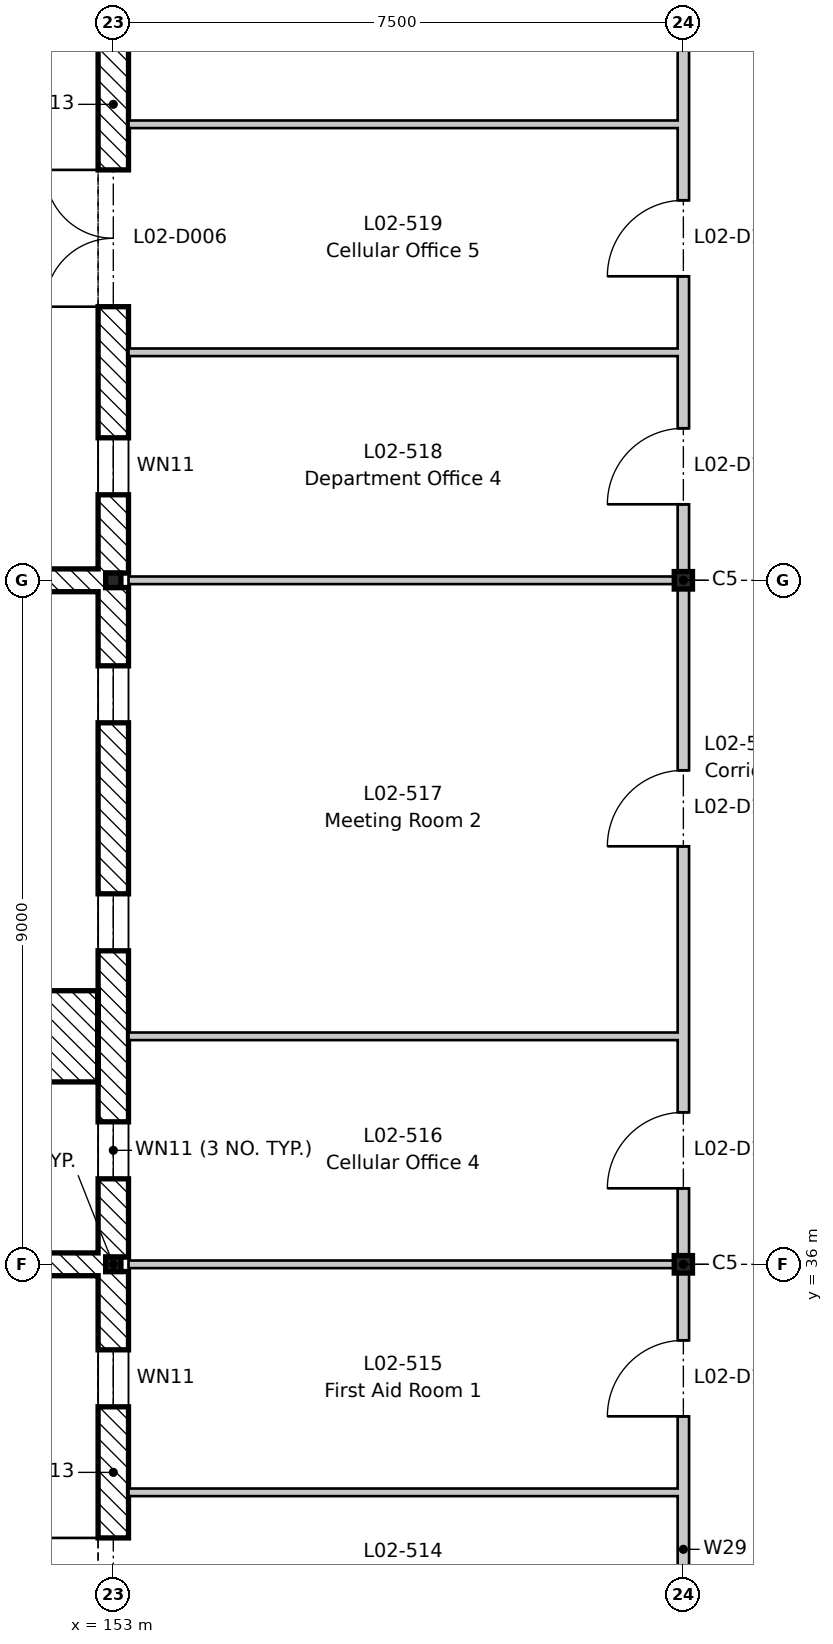
"""IFC4 building model, lengths in metres.
Left out: names, types, materials, properties, quantities, classifications, styles, units other than length and angle.
Written with IfcOpenShell. Run it as: python <this file> out.ifc"""

import sys

from ifc_helpers import new_model, si_unit, direction, frame, frame_2d, origin, origin_2d, place, context, subcontext, project, spatial, rectangle, i_section, extrude, element, fill, save


model = new_model("IFC4")
c1 = context("Model", 3, precision=1e-05, world=origin(), true_north=direction((0.0, 1.0)))
c2 = subcontext(c1, "Body", "Model", "MODEL_VIEW")
j1 = project(units=[si_unit("LENGTHUNIT", "METRE"), si_unit("PLANEANGLEUNIT", "RADIAN")], contexts=[c1])
p1 = place(None, origin())
s1 = spatial("IfcSite", under=j1, at=p1, CompositionType="ELEMENT")
p2 = place(p1, origin())
s2 = spatial("IfcBuilding", under=s1, at=p2, CompositionType="ELEMENT")
p3 = place(p2, frame((0.0, 0.0, 9.9)))
s3 = spatial("IfcBuildingStorey", under=s2, at=p3, CompositionType="ELEMENT", Elevation=9.9)
for number, where, z_axis, x_axis in (
    (1, (153.0, 36.0, -0.2), (0.0, 0.0, 1.0), (1.0, 0.0, 0.0)),
    (2, (153.0, 45.0, -0.2), (0.0, 0.0, 1.0), (1.0, 0.0, 0.0)),
):
    element("IfcColumn", number, at=place(p3, frame(where, z_axis=z_axis, x_axis=x_axis)), inside=s3, PredefinedType="COLUMN", context=c2, shape_type="SweptSolid", body=[
        extrude(i_section(OverallWidth=0.2, OverallDepth=0.19, WebThickness=0.007, FlangeThickness=0.01, FilletRadius=0.018, at=origin_2d()), origin(), (0.0, 0.0, 1.0), 4.45),
    ])
for number, where, z_axis, x_axis in (
    (3, (160.5, 36.0, -0.2), (0.0, 0.0, 1.0), (1.0, 0.0, 0.0)),
    (4, (160.5, 45.0, -0.2), (0.0, 0.0, 1.0), (1.0, 0.0, 0.0)),
):
    element("IfcColumn", number, at=place(p3, frame(where, z_axis=z_axis, x_axis=x_axis)), inside=s3, PredefinedType="COLUMN", context=c2, shape_type="SweptSolid", body=[
        extrude(i_section(OverallWidth=0.24, OverallDepth=0.23, WebThickness=0.008, FlangeThickness=0.012, FilletRadius=0.021, at=origin_2d()), origin(), (0.0, 0.0, 1.0), 4.45),
    ])
p4 = place(p3, frame((153.0, 27.095, 0.0), z_axis=(0.0, 0.0, 1.0), x_axis=(0.0, 1.0, 0.0)))
e5 = element("IfcWall", 5, at=p4, inside=s3, PredefinedType="STANDARD", context=c2, shape_type="SweptSolid", body=[
    extrude(rectangle(XDim=8.81, YDim=0.4, at=frame_2d((4.405, 0.0))), origin(), (0.0, 0.0, 1.0), 3.85),
])
p5 = place(p4, frame((3.505, 0.0, 0.0)))
e6 = element("IfcOpeningElement", 6, at=p5, cuts=e5, PredefinedType="OPENING", context=c2, shape_type="SweptSolid", body=[
    extrude(rectangle(XDim=1.8, YDim=2.4, at=frame_2d((0.9, 1.2))), frame((0.0, 0.21, 0.0), z_axis=(0.0, -1.0, 0.0), x_axis=(1.0, 0.0, 0.0)), (0.0, 0.0, 1.0), 0.42),
])
p6 = place(p4, frame((1.03, 0.0, 1.5)))
e7 = element("IfcOpeningElement", 7, at=p6, cuts=e5, PredefinedType="OPENING", context=c2, shape_type="SweptSolid", body=[
    extrude(rectangle(XDim=0.75, YDim=1.2, at=frame_2d((0.375, 0.6))), frame((0.0, 0.21, 0.0), z_axis=(0.0, -1.0, 0.0), x_axis=(1.0, 0.0, 0.0)), (0.0, 0.0, 1.0), 0.42),
])
p7 = place(p4, frame((7.03, 0.0, 1.5)))
e8 = element("IfcOpeningElement", 8, at=p7, cuts=e5, PredefinedType="OPENING", context=c2, shape_type="SweptSolid", body=[
    extrude(rectangle(XDim=0.75, YDim=1.2, at=frame_2d((0.375, 0.6))), frame((0.0, 0.21, 0.0), z_axis=(0.0, -1.0, 0.0), x_axis=(1.0, 0.0, 0.0)), (0.0, 0.0, 1.0), 0.42),
])
p8 = place(p3, frame((153.0, 36.095, 0.0), z_axis=(0.0, 0.0, 1.0), x_axis=(0.0, 1.0, 0.0)))
e9 = element("IfcWall", 9, at=p8, inside=s3, PredefinedType="STANDARD", context=c2, shape_type="SweptSolid", body=[
    extrude(rectangle(XDim=8.81, YDim=0.4, at=frame_2d((4.405, 0.0))), origin(), (0.0, 0.0, 1.0), 3.85),
])
p9 = place(p8, frame((1.03, 0.0, 1.5)))
e10 = element("IfcOpeningElement", 10, at=p9, cuts=e9, PredefinedType="OPENING", context=c2, shape_type="SweptSolid", body=[
    extrude(rectangle(XDim=0.75, YDim=1.2, at=frame_2d((0.375, 0.6))), frame((0.0, 0.21, 0.0), z_axis=(0.0, -1.0, 0.0), x_axis=(1.0, 0.0, 0.0)), (0.0, 0.0, 1.0), 0.42),
])
p10 = place(p8, frame((4.03, 0.0, 1.5)))
e11 = element("IfcOpeningElement", 11, at=p10, cuts=e9, PredefinedType="OPENING", context=c2, shape_type="SweptSolid", body=[
    extrude(rectangle(XDim=0.75, YDim=1.2, at=frame_2d((0.375, 0.6))), frame((0.0, 0.21, 0.0), z_axis=(0.0, -1.0, 0.0), x_axis=(1.0, 0.0, 0.0)), (0.0, 0.0, 1.0), 0.42),
])
p11 = place(p8, frame((7.03, 0.0, 1.5)))
e12 = element("IfcOpeningElement", 12, at=p11, cuts=e9, PredefinedType="OPENING", context=c2, shape_type="SweptSolid", body=[
    extrude(rectangle(XDim=0.75, YDim=1.2, at=frame_2d((0.375, 0.6))), frame((0.0, 0.21, 0.0), z_axis=(0.0, -1.0, 0.0), x_axis=(1.0, 0.0, 0.0)), (0.0, 0.0, 1.0), 0.42),
])
p12 = place(p3, frame((153.0, 45.095, 0.0), z_axis=(0.0, 0.0, 1.0), x_axis=(0.0, 1.0, 0.0)))
e13 = element("IfcWall", 13, at=p12, inside=s3, PredefinedType="STANDARD", context=c2, shape_type="SweptSolid", body=[
    extrude(rectangle(XDim=8.81, YDim=0.4, at=frame_2d((4.405, 0.0))), origin(), (0.0, 0.0, 1.0), 3.85),
])
p13 = place(p12, frame((3.505, 0.0, 0.0)))
e14 = element("IfcOpeningElement", 14, at=p13, cuts=e13, PredefinedType="OPENING", context=c2, shape_type="SweptSolid", body=[
    extrude(rectangle(XDim=1.8, YDim=2.4, at=frame_2d((0.9, 1.2))), frame((0.0, 0.21, 0.0), z_axis=(0.0, -1.0, 0.0), x_axis=(1.0, 0.0, 0.0)), (0.0, 0.0, 1.0), 0.42),
])
p14 = place(p12, frame((1.03, 0.0, 1.5)))
e15 = element("IfcOpeningElement", 15, at=p14, cuts=e13, PredefinedType="OPENING", context=c2, shape_type="SweptSolid", body=[
    extrude(rectangle(XDim=0.75, YDim=1.2, at=frame_2d((0.375, 0.6))), frame((0.0, 0.21, 0.0), z_axis=(0.0, -1.0, 0.0), x_axis=(1.0, 0.0, 0.0)), (0.0, 0.0, 1.0), 0.42),
])
p15 = place(p12, frame((7.03, 0.0, 1.5)))
e16 = element("IfcOpeningElement", 16, at=p15, cuts=e13, PredefinedType="OPENING", context=c2, shape_type="SweptSolid", body=[
    extrude(rectangle(XDim=0.75, YDim=1.2, at=frame_2d((0.375, 0.6))), frame((0.0, 0.21, 0.0), z_axis=(0.0, -1.0, 0.0), x_axis=(1.0, 0.0, 0.0)), (0.0, 0.0, 1.0), 0.42),
])
p16 = place(p3, frame((152.2, 38.4, 0.0), z_axis=(0.0, 0.0, 1.0), x_axis=(0.0, 1.0, 0.0)))
e17 = element("IfcWall", 17, at=p16, inside=s3, PredefinedType="STANDARD", context=c2, shape_type="SweptSolid", body=[
    extrude(rectangle(XDim=1.2, YDim=1.2, at=frame_2d((0.6, 0.0))), origin(), (0.0, 0.0, 1.0), 3.65),
])
p17 = place(p3, frame((152.9, 36.0, 0.0), z_axis=(0.0, 0.0, 1.0), x_axis=(-1.0, 0.0, 0.0)))
e18 = element("IfcWall", 18, at=p17, inside=s3, PredefinedType="STANDARD", context=c2, shape_type="SweptSolid", body=[
    extrude(rectangle(XDim=2.9, YDim=0.3, at=frame_2d((1.45, 0.0))), origin(), (0.0, 0.0, 1.0), 3.97),
])
p18 = place(p3, frame((152.9, 45.0, 0.0), z_axis=(0.0, 0.0, 1.0), x_axis=(-1.0, 0.0, 0.0)))
e19 = element("IfcWall", 19, at=p18, inside=s3, PredefinedType="STANDARD", context=c2, shape_type="SweptSolid", body=[
    extrude(rectangle(XDim=2.3, YDim=0.3, at=frame_2d((1.15, 0.0))), origin(), (0.0, 0.0, 1.0), 3.97),
])
p19 = place(p3, frame((153.2, 33.0, 0.0), z_axis=(0.0, 0.0, 1.0), x_axis=(1.0, 0.0, 0.0)))
e20 = element("IfcWall", 20, at=p19, inside=s3, PredefinedType="PARTITIONING", context=c2, shape_type="SweptSolid", body=[
    extrude(rectangle(XDim=7.225, YDim=0.1, at=frame_2d((3.613, 0.0))), origin(), (0.0, 0.0, 1.0), 4.25),
])
p20 = place(p3, frame((153.2, 36.0, 0.0), z_axis=(0.0, 0.0, 1.0), x_axis=(1.0, 0.0, 0.0)))
e21 = element("IfcWall", 21, at=p20, inside=s3, PredefinedType="PARTITIONING", context=c2, shape_type="SweptSolid", body=[
    extrude(rectangle(XDim=7.225, YDim=0.1, at=frame_2d((3.613, 0.0))), origin(), (0.0, 0.0, 1.0), 3.9),
])
p21 = place(p3, frame((153.2, 39.0, 0.0), z_axis=(0.0, 0.0, 1.0), x_axis=(1.0, 0.0, 0.0)))
e22 = element("IfcWall", 22, at=p21, inside=s3, PredefinedType="PARTITIONING", context=c2, shape_type="SweptSolid", body=[
    extrude(rectangle(XDim=7.225, YDim=0.1, at=frame_2d((3.613, 0.0))), origin(), (0.0, 0.0, 1.0), 4.25),
])
p22 = place(p3, frame((153.2, 45.0, 0.0), z_axis=(0.0, 0.0, 1.0), x_axis=(1.0, 0.0, 0.0)))
e23 = element("IfcWall", 23, at=p22, inside=s3, PredefinedType="PARTITIONING", context=c2, shape_type="SweptSolid", body=[
    extrude(rectangle(XDim=7.225, YDim=0.1, at=frame_2d((3.613, 0.0))), origin(), (0.0, 0.0, 1.0), 3.9),
])
for number, where, z_axis, x_axis in (
    (24, (153.2, 48.0, 0.0), (0.0, 0.0, 1.0), (1.0, 0.0, 0.0)),
    (25, (153.2, 51.0, 0.0), (0.0, 0.0, 1.0), (1.0, 0.0, 0.0)),
):
    element("IfcWall", number, at=place(p3, frame(where, z_axis=z_axis, x_axis=x_axis)), inside=s3, PredefinedType="PARTITIONING", context=c2, shape_type="SweptSolid", body=[
        extrude(rectangle(XDim=7.225, YDim=0.1, at=frame_2d((3.613, 0.0))), origin(), (0.0, 0.0, 1.0), 4.25),
    ])
p23 = place(p3, frame((160.5, -8.8, 0.0), z_axis=(0.0, 0.0, 1.0), x_axis=(0.0, 1.0, 0.0)))
e26 = element("IfcWall", 26, at=p23, inside=s3, PredefinedType="PARTITIONING", context=c2, shape_type="SweptSolid", body=[
    extrude(rectangle(XDim=62.6, YDim=0.15, at=frame_2d((31.3, 0.0))), origin(), (0.0, 0.0, 1.0), 3.73),
])
p24 = place(p23, frame((0.8, 0.0, 0.0)))
e27 = element("IfcOpeningElement", 27, at=p24, cuts=e26, PredefinedType="OPENING", context=c2, shape_type="SweptSolid", body=[
    extrude(rectangle(XDim=1.0, YDim=2.1, at=frame_2d((0.5, 1.05))), frame((0.0, 0.085, 0.0), z_axis=(0.0, -1.0, 0.0), x_axis=(1.0, 0.0, 0.0)), (0.0, 0.0, 1.0), 0.17),
])
p25 = place(p23, frame((5.3, 0.0, 0.0)))
e28 = element("IfcOpeningElement", 28, at=p25, cuts=e26, PredefinedType="OPENING", context=c2, shape_type="SweptSolid", body=[
    extrude(rectangle(XDim=1.0, YDim=2.1, at=frame_2d((0.5, 1.05))), frame((0.0, 0.085, 0.0), z_axis=(0.0, -1.0, 0.0), x_axis=(1.0, 0.0, 0.0)), (0.0, 0.0, 1.0), 0.17),
])
p26 = place(p23, frame((9.8, 0.0, 0.0)))
e29 = element("IfcOpeningElement", 29, at=p26, cuts=e26, PredefinedType="OPENING", context=c2, shape_type="SweptSolid", body=[
    extrude(rectangle(XDim=1.0, YDim=2.1, at=frame_2d((0.5, 1.05))), frame((0.0, 0.085, 0.0), z_axis=(0.0, -1.0, 0.0), x_axis=(1.0, 0.0, 0.0)), (0.0, 0.0, 1.0), 0.17),
])
p27 = place(p23, frame((12.8, 0.0, 0.0)))
e30 = element("IfcOpeningElement", 30, at=p27, cuts=e26, PredefinedType="OPENING", context=c2, shape_type="SweptSolid", body=[
    extrude(rectangle(XDim=1.0, YDim=2.1, at=frame_2d((0.5, 1.05))), frame((0.0, 0.085, 0.0), z_axis=(0.0, -1.0, 0.0), x_axis=(1.0, 0.0, 0.0)), (0.0, 0.0, 1.0), 0.17),
])
p28 = place(p23, frame((18.6, 0.0, 0.0)))
e31 = element("IfcOpeningElement", 31, at=p28, cuts=e26, PredefinedType="OPENING", context=c2, shape_type="SweptSolid", body=[
    extrude(rectangle(XDim=1.4, YDim=2.1, at=frame_2d((0.7, 1.05))), frame((0.0, 0.085, 0.0), z_axis=(0.0, -1.0, 0.0), x_axis=(1.0, 0.0, 0.0)), (0.0, 0.0, 1.0), 0.17),
])
p29 = place(p23, frame((27.55, 0.0, 0.0)))
e32 = element("IfcOpeningElement", 32, at=p29, cuts=e26, PredefinedType="OPENING", context=c2, shape_type="SweptSolid", body=[
    extrude(rectangle(XDim=1.0, YDim=2.1, at=frame_2d((0.5, 1.05))), frame((0.0, 0.085, 0.0), z_axis=(0.0, -1.0, 0.0), x_axis=(1.0, 0.0, 0.0)), (0.0, 0.0, 1.0), 0.17),
])
p30 = place(p23, frame((30.8, 0.0, 0.0)))
e33 = element("IfcOpeningElement", 33, at=p30, cuts=e26, PredefinedType="OPENING", context=c2, shape_type="SweptSolid", body=[
    extrude(rectangle(XDim=1.0, YDim=2.1, at=frame_2d((0.5, 1.05))), frame((0.0, 0.085, 0.0), z_axis=(0.0, -1.0, 0.0), x_axis=(1.0, 0.0, 0.0)), (0.0, 0.0, 1.0), 0.17),
])
p31 = place(p23, frame((33.8, 0.0, 0.0)))
e34 = element("IfcOpeningElement", 34, at=p31, cuts=e26, PredefinedType="OPENING", context=c2, shape_type="SweptSolid", body=[
    extrude(rectangle(XDim=1.0, YDim=2.1, at=frame_2d((0.5, 1.05))), frame((0.0, 0.085, 0.0), z_axis=(0.0, -1.0, 0.0), x_axis=(1.0, 0.0, 0.0)), (0.0, 0.0, 1.0), 0.17),
])
p32 = place(p23, frame((38.3, 0.0, 0.0)))
e35 = element("IfcOpeningElement", 35, at=p32, cuts=e26, PredefinedType="OPENING", context=c2, shape_type="SweptSolid", body=[
    extrude(rectangle(XDim=1.0, YDim=2.1, at=frame_2d((0.5, 1.05))), frame((0.0, 0.085, 0.0), z_axis=(0.0, -1.0, 0.0), x_axis=(1.0, 0.0, 0.0)), (0.0, 0.0, 1.0), 0.17),
])
p33 = place(p23, frame((42.8, 0.0, 0.0)))
e36 = element("IfcOpeningElement", 36, at=p33, cuts=e26, PredefinedType="OPENING", context=c2, shape_type="SweptSolid", body=[
    extrude(rectangle(XDim=1.0, YDim=2.1, at=frame_2d((0.5, 1.05))), frame((0.0, 0.085, 0.0), z_axis=(0.0, -1.0, 0.0), x_axis=(1.0, 0.0, 0.0)), (0.0, 0.0, 1.0), 0.17),
])
p34 = place(p23, frame((45.8, 0.0, 0.0)))
e37 = element("IfcOpeningElement", 37, at=p34, cuts=e26, PredefinedType="OPENING", context=c2, shape_type="SweptSolid", body=[
    extrude(rectangle(XDim=1.0, YDim=2.1, at=frame_2d((0.5, 1.05))), frame((0.0, 0.085, 0.0), z_axis=(0.0, -1.0, 0.0), x_axis=(1.0, 0.0, 0.0)), (0.0, 0.0, 1.0), 0.17),
])
p35 = place(p23, frame((50.3, 0.0, 0.0)))
e38 = element("IfcOpeningElement", 38, at=p35, cuts=e26, PredefinedType="OPENING", context=c2, shape_type="SweptSolid", body=[
    extrude(rectangle(XDim=1.0, YDim=2.1, at=frame_2d((0.5, 1.05))), frame((0.0, 0.085, 0.0), z_axis=(0.0, -1.0, 0.0), x_axis=(1.0, 0.0, 0.0)), (0.0, 0.0, 1.0), 0.17),
])
p36 = place(p23, frame((54.8, 0.0, 0.0)))
e39 = element("IfcOpeningElement", 39, at=p36, cuts=e26, PredefinedType="OPENING", context=c2, shape_type="SweptSolid", body=[
    extrude(rectangle(XDim=1.0, YDim=2.1, at=frame_2d((0.5, 1.05))), frame((0.0, 0.085, 0.0), z_axis=(0.0, -1.0, 0.0), x_axis=(1.0, 0.0, 0.0)), (0.0, 0.0, 1.0), 0.17),
])
p37 = place(p23, frame((57.8, 0.0, 0.0)))
e40 = element("IfcOpeningElement", 40, at=p37, cuts=e26, PredefinedType="OPENING", context=c2, shape_type="SweptSolid", body=[
    extrude(rectangle(XDim=1.0, YDim=2.1, at=frame_2d((0.5, 1.05))), frame((0.0, 0.085, 0.0), z_axis=(0.0, -1.0, 0.0), x_axis=(1.0, 0.0, 0.0)), (0.0, 0.0, 1.0), 0.17),
])
p38 = place(p23, frame((60.8, 0.0, 0.0)))
e41 = element("IfcOpeningElement", 41, at=p38, cuts=e26, PredefinedType="OPENING", context=c2, shape_type="SweptSolid", body=[
    extrude(rectangle(XDim=1.0, YDim=2.1, at=frame_2d((0.5, 1.05))), frame((0.0, 0.085, 0.0), z_axis=(0.0, -1.0, 0.0), x_axis=(1.0, 0.0, 0.0)), (0.0, 0.0, 1.0), 0.17),
])
p39 = place(p5, origin())
e42 = element("IfcDoor", 42, at=p39, inside=s3, OperationType="DOUBLE_DOOR_SINGLE_SWING", PredefinedType="DOOR", context=c2, shape_type="SweptSolid", body=[
    extrude(rectangle(XDim=1.8, YDim=2.4, at=frame_2d((0.9, 1.2))), frame((0.0, 0.025, 0.0), z_axis=(0.0, -1.0, 0.0), x_axis=(1.0, 0.0, 0.0)), (0.0, 0.0, 1.0), 0.05),
])
fill(e6, e42)
p40 = place(p7, origin())
e43 = element("IfcWindow", 43, at=p40, inside=s3, PartitioningType="SINGLE_PANEL", PredefinedType="WINDOW", context=c2, shape_type="SweptSolid", body=[
    extrude(rectangle(XDim=0.75, YDim=1.2, at=frame_2d((0.375, 0.6))), frame((0.0, -0.12, 0.0), z_axis=(0.0, -1.0, 0.0), x_axis=(1.0, 0.0, 0.0)), (0.0, 0.0, 1.0), 0.06),
])
fill(e8, e43)
p41 = place(p9, origin())
e44 = element("IfcWindow", 44, at=p41, inside=s3, PartitioningType="SINGLE_PANEL", PredefinedType="WINDOW", context=c2, shape_type="SweptSolid", body=[
    extrude(rectangle(XDim=0.75, YDim=1.2, at=frame_2d((0.375, 0.6))), frame((0.0, -0.12, 0.0), z_axis=(0.0, -1.0, 0.0), x_axis=(1.0, 0.0, 0.0)), (0.0, 0.0, 1.0), 0.06),
])
fill(e10, e44)
p42 = place(p10, origin())
e45 = element("IfcWindow", 45, at=p42, inside=s3, PartitioningType="SINGLE_PANEL", PredefinedType="WINDOW", context=c2, shape_type="SweptSolid", body=[
    extrude(rectangle(XDim=0.75, YDim=1.2, at=frame_2d((0.375, 0.6))), frame((0.0, -0.12, 0.0), z_axis=(0.0, -1.0, 0.0), x_axis=(1.0, 0.0, 0.0)), (0.0, 0.0, 1.0), 0.06),
])
fill(e11, e45)
p43 = place(p11, origin())
e46 = element("IfcWindow", 46, at=p43, inside=s3, PartitioningType="SINGLE_PANEL", PredefinedType="WINDOW", context=c2, shape_type="SweptSolid", body=[
    extrude(rectangle(XDim=0.75, YDim=1.2, at=frame_2d((0.375, 0.6))), frame((0.0, -0.12, 0.0), z_axis=(0.0, -1.0, 0.0), x_axis=(1.0, 0.0, 0.0)), (0.0, 0.0, 1.0), 0.06),
])
fill(e12, e46)
p44 = place(p13, origin())
e47 = element("IfcDoor", 47, at=p44, inside=s3, OperationType="DOUBLE_DOOR_SINGLE_SWING", PredefinedType="DOOR", context=c2, shape_type="SweptSolid", body=[
    extrude(rectangle(XDim=1.8, YDim=2.4, at=frame_2d((0.9, 1.2))), frame((0.0, 0.025, 0.0), z_axis=(0.0, -1.0, 0.0), x_axis=(1.0, 0.0, 0.0)), (0.0, 0.0, 1.0), 0.05),
])
fill(e14, e47)
p45 = place(p14, origin())
e48 = element("IfcWindow", 48, at=p45, inside=s3, PartitioningType="SINGLE_PANEL", PredefinedType="WINDOW", context=c2, shape_type="SweptSolid", body=[
    extrude(rectangle(XDim=0.75, YDim=1.2, at=frame_2d((0.375, 0.6))), frame((0.0, -0.12, 0.0), z_axis=(0.0, -1.0, 0.0), x_axis=(1.0, 0.0, 0.0)), (0.0, 0.0, 1.0), 0.06),
])
fill(e15, e48)
p46 = place(p33, origin())
e49 = element("IfcDoor", 49, at=p46, inside=s3, OperationType="SINGLE_SWING_LEFT", PredefinedType="DOOR", context=c2, shape_type="SweptSolid", body=[
    extrude(rectangle(XDim=1.0, YDim=2.1, at=frame_2d((0.5, 1.05))), frame((0.0, 0.025, 0.0), z_axis=(0.0, -1.0, 0.0), x_axis=(1.0, 0.0, 0.0)), (0.0, 0.0, 1.0), 0.05),
])
fill(e36, e49)
p47 = place(p34, origin())
e50 = element("IfcDoor", 50, at=p47, inside=s3, OperationType="SINGLE_SWING_LEFT", PredefinedType="DOOR", context=c2, shape_type="SweptSolid", body=[
    extrude(rectangle(XDim=1.0, YDim=2.1, at=frame_2d((0.5, 1.05))), frame((0.0, 0.025, 0.0), z_axis=(0.0, -1.0, 0.0), x_axis=(1.0, 0.0, 0.0)), (0.0, 0.0, 1.0), 0.05),
])
fill(e37, e50)
p48 = place(p35, origin())
e51 = element("IfcDoor", 51, at=p48, inside=s3, OperationType="SINGLE_SWING_LEFT", PredefinedType="DOOR", context=c2, shape_type="SweptSolid", body=[
    extrude(rectangle(XDim=1.0, YDim=2.1, at=frame_2d((0.5, 1.05))), frame((0.0, 0.025, 0.0), z_axis=(0.0, -1.0, 0.0), x_axis=(1.0, 0.0, 0.0)), (0.0, 0.0, 1.0), 0.05),
])
fill(e38, e51)
p49 = place(p36, origin())
e52 = element("IfcDoor", 52, at=p49, inside=s3, OperationType="SINGLE_SWING_LEFT", PredefinedType="DOOR", context=c2, shape_type="SweptSolid", body=[
    extrude(rectangle(XDim=1.0, YDim=2.1, at=frame_2d((0.5, 1.05))), frame((0.0, 0.025, 0.0), z_axis=(0.0, -1.0, 0.0), x_axis=(1.0, 0.0, 0.0)), (0.0, 0.0, 1.0), 0.05),
])
fill(e39, e52)
p50 = place(p37, origin())
e53 = element("IfcDoor", 53, at=p50, inside=s3, OperationType="SINGLE_SWING_LEFT", PredefinedType="DOOR", context=c2, shape_type="SweptSolid", body=[
    extrude(rectangle(XDim=1.0, YDim=2.1, at=frame_2d((0.5, 1.05))), frame((0.0, 0.025, 0.0), z_axis=(0.0, -1.0, 0.0), x_axis=(1.0, 0.0, 0.0)), (0.0, 0.0, 1.0), 0.05),
])
fill(e40, e53)
save(model, sys.argv[1])
